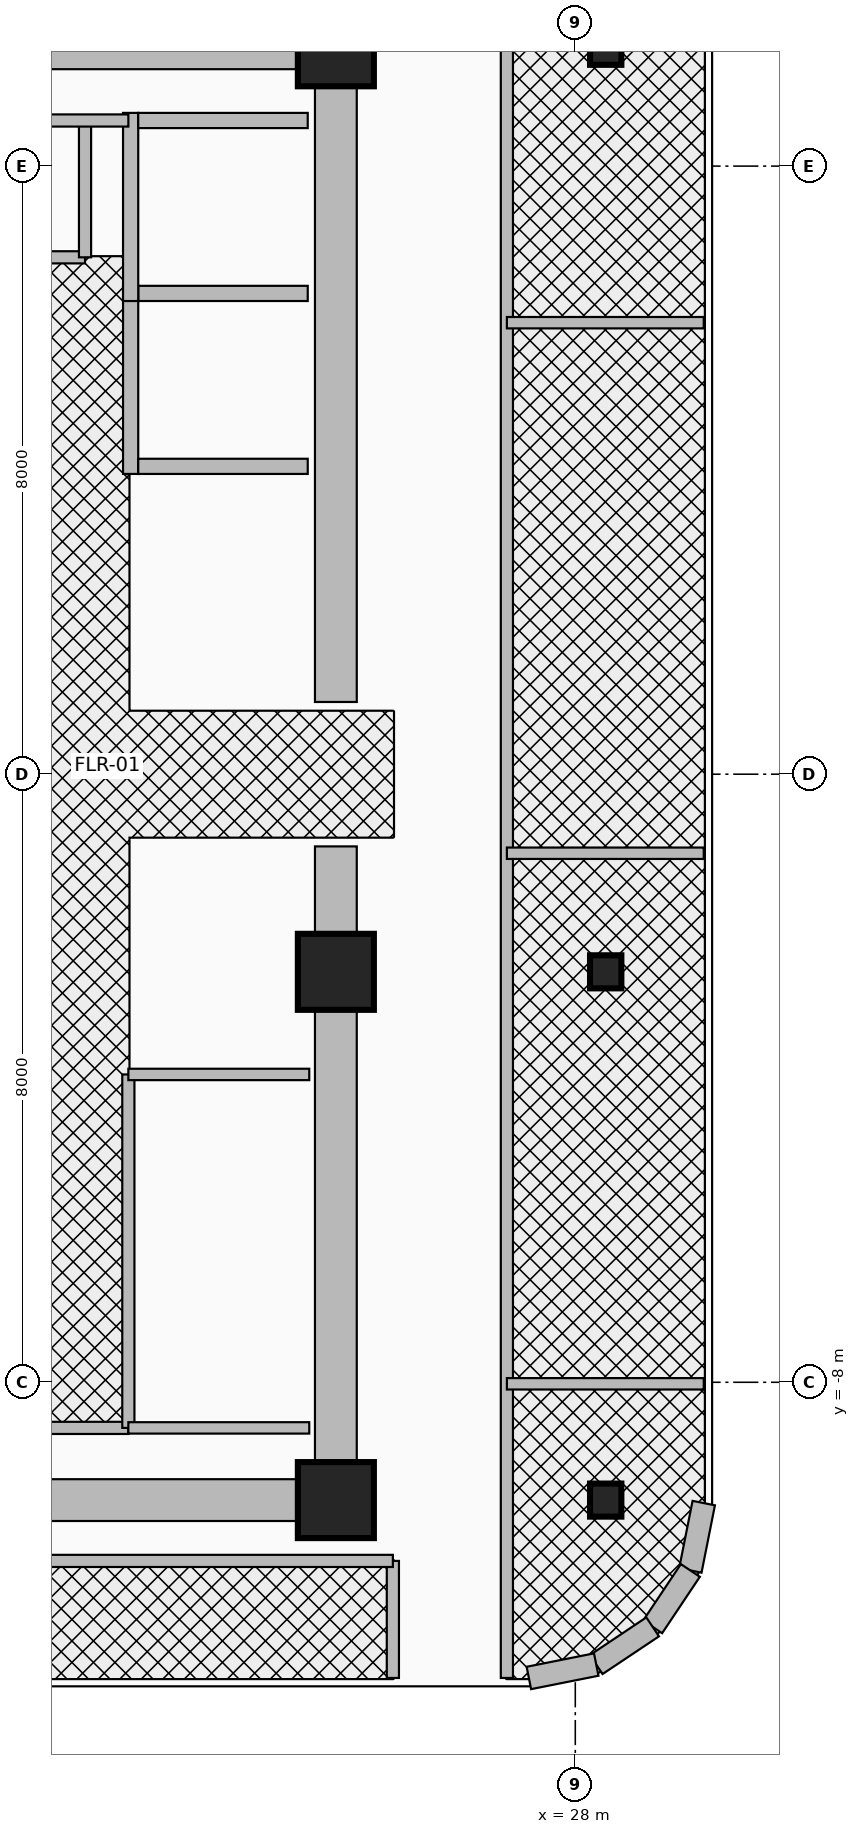
"""IFC4 building model, lengths in metres.
Left out: names, types, materials, properties, quantities, classifications, styles, units other than length and angle.
Written with IfcOpenShell. Run it as: python <this file> out.ifc"""

import sys

from ifc_helpers import new_model, si_unit, direction, frame, frame_2d, origin, origin_2d, place, context, subcontext, project, spatial, rectangle, i_section, extrude, source, transform, mapped, element, fill, save


model = new_model("IFC4")
c1 = context("Model", 3, precision=1e-05, world=origin(), true_north=direction((0.0, 1.0)))
c2 = subcontext(c1, "Body", "Model", "MODEL_VIEW")
j1 = project(units=[si_unit("LENGTHUNIT", "METRE"), si_unit("PLANEANGLEUNIT", "RADIAN")], contexts=[c1])
p1 = place(None, origin())
s1 = spatial("IfcSite", under=j1, at=p1, CompositionType="ELEMENT")
p2 = place(p1, origin())
s2 = spatial("IfcBuilding", under=s1, at=p2, CompositionType="ELEMENT")
p3 = place(p2, frame((0.0, 0.0, 172.3)))
s3 = spatial("IfcBuildingStorey", under=s2, at=p3, CompositionType="ELEMENT", Elevation=172.3)
for number, where, z_axis, x_axis in (
    (1, (24.85, -9.825, 0.0), (0.0, 0.0, 1.0), (0.0, 1.0, 0.0)),
    (2, (24.85, 0.95, 0.0), (0.0, 0.0, 1.0), (0.0, 1.0, 0.0)),
):
    element("IfcWall", number, at=place(p3, frame(where, z_axis=z_axis, x_axis=x_axis)), inside=s3, PredefinedType="SHEAR", context=c2, shape_type="SweptSolid", body=[
        extrude(rectangle(XDim=8.875, YDim=0.55, at=frame_2d((4.438, 0.0))), origin(), (0.0, 0.0, 1.0), 3.93),
    ])
for number, where, z_axis, x_axis in (
    (3, (15.85, 9.55, 0.0), (0.0, 0.0, 1.0), (1.0, 0.0, 0.0)),
    (4, (15.85, -9.55, 0.0), (0.0, 0.0, 1.0), (1.0, 0.0, 0.0)),
):
    element("IfcWall", number, at=place(p3, frame(where, z_axis=z_axis, x_axis=x_axis)), inside=s3, PredefinedType="SHEAR", context=c2, shape_type="SweptSolid", body=[
        extrude(rectangle(XDim=9.0, YDim=0.55, at=frame_2d((4.5, 0.0))), origin(), (0.0, 0.0, 1.0), 3.93),
    ])
m1 = source(origin(), c2, "Body", "SweptSolid", [
    extrude(rectangle(XDim=1.0, YDim=1.0, at=origin_2d()), origin(), (0.0, 0.0, 1.0), 4.25),
])
p4 = place(p3, frame((24.85, -9.55, 0.0), z_axis=(0.0, 0.0, 1.0), x_axis=(1.0, 0.0, 0.0)))
e5 = element("IfcColumn", 5, at=p4, inside=s3, PredefinedType="COLUMN", context=c2, shape_type="MappedRepresentation", body=[
    mapped(m1, transform((0.0, 0.0, 0.0), x_axis=(1.0, 0.0, 0.0), y_axis=(0.0, 1.0, 0.0), z_axis=(0.0, 0.0, 1.0), scale=1.0)),
])
m2 = source(origin(), c2, "Body", "SweptSolid", [
    extrude(i_section(OverallWidth=0.412, OverallDepth=0.435, WebThickness=0.036, FlangeThickness=0.057, at=origin_2d()), origin(), (0.0, 0.0, 1.0), 4.25),
])
p5 = place(p3, frame((28.4, -9.55, 0.0), z_axis=(0.0, 0.0, 1.0), x_axis=(1.0, 0.0, 0.0)))
e6 = element("IfcColumn", 6, at=p5, inside=s3, PredefinedType="COLUMN", context=c2, shape_type="MappedRepresentation", body=[
    mapped(m2, transform((0.0, 0.0, 0.0), x_axis=(1.0, 0.0, 0.0), y_axis=(0.0, 1.0, 0.0), z_axis=(0.0, 0.0, 1.0), scale=1.0)),
])
p6 = place(p3, frame((24.85, -2.6, 0.0), z_axis=(0.0, 0.0, 1.0), x_axis=(1.0, 0.0, 0.0)))
e7 = element("IfcColumn", 7, at=p6, inside=s3, PredefinedType="COLUMN", context=c2, shape_type="MappedRepresentation", body=[
    mapped(m1, transform((0.0, 0.0, 0.0), x_axis=(1.0, 0.0, 0.0), y_axis=(0.0, 1.0, 0.0), z_axis=(0.0, 0.0, 1.0), scale=1.0)),
])
p7 = place(p3, frame((28.4, -2.6, 0.0), z_axis=(0.0, 0.0, 1.0), x_axis=(1.0, 0.0, 0.0)))
e8 = element("IfcColumn", 8, at=p7, inside=s3, PredefinedType="COLUMN", context=c2, shape_type="MappedRepresentation", body=[
    mapped(m2, transform((0.0, 0.0, 0.0), x_axis=(1.0, 0.0, 0.0), y_axis=(0.0, 1.0, 0.0), z_axis=(0.0, 0.0, 1.0), scale=1.0)),
])
p8 = place(p3, frame((24.85, 9.55, 0.0), z_axis=(0.0, 0.0, 1.0), x_axis=(1.0, 0.0, 0.0)))
e9 = element("IfcColumn", 9, at=p8, inside=s3, PredefinedType="COLUMN", context=c2, shape_type="MappedRepresentation", body=[
    mapped(m1, transform((0.0, 0.0, 0.0), x_axis=(1.0, 0.0, 0.0), y_axis=(0.0, 1.0, 0.0), z_axis=(0.0, 0.0, 1.0), scale=1.0)),
])
p9 = place(p3, frame((28.4, 9.55, 0.0), z_axis=(0.0, 0.0, 1.0), x_axis=(1.0, 0.0, 0.0)))
e10 = element("IfcColumn", 10, at=p9, inside=s3, PredefinedType="COLUMN", context=c2, shape_type="MappedRepresentation", body=[
    mapped(m2, transform((0.0, 0.0, 0.0), x_axis=(1.0, 0.0, 0.0), y_axis=(0.0, 1.0, 0.0), z_axis=(0.0, 0.0, 1.0), scale=1.0)),
])
p10 = place(p3, frame((29.69, -9.589, 0.0), z_axis=(0.0, 0.0, 1.0), x_axis=(-0.195025152871, -0.980798241101, 0.0)))
e11 = element("IfcWall", 11, at=p10, inside=s3, PredefinedType="SOLIDWALL", context=c2, shape_type="SweptSolid", body=[
    extrude(rectangle(XDim=0.904, YDim=0.3, at=frame_2d((0.452, 0.0))), origin(), (0.0, 0.0, 1.0), 3.93),
])
p11 = place(p3, frame((29.514, -10.476, 0.0), z_axis=(0.0, 0.0, 1.0), x_axis=(-0.555520488502, -0.831502848374, 0.0)))
e12 = element("IfcWall", 12, at=p11, inside=s3, PredefinedType="SOLIDWALL", context=c2, shape_type="SweptSolid", body=[
    extrude(rectangle(XDim=0.893, YDim=0.3, at=frame_2d((0.446, 0.0))), origin(), (0.0, 0.0, 1.0), 3.93),
])
p12 = place(p3, frame((29.018, -11.218, 0.0), z_axis=(0.0, 0.0, 1.0), x_axis=(-0.83158722889, -0.555394167009, 0.0)))
e13 = element("IfcWall", 13, at=p12, inside=s3, PredefinedType="SOLIDWALL", context=c2, shape_type="SweptSolid", body=[
    extrude(rectangle(XDim=0.893, YDim=0.3, at=frame_2d((0.446, 0.0))), origin(), (0.0, 0.0, 1.0), 3.93),
])
p13 = place(p3, frame((28.275, -11.714, 0.0), z_axis=(0.0, 0.0, 1.0), x_axis=(-0.980787963133, -0.19507683454, 0.0)))
e14 = element("IfcWall", 14, at=p13, inside=s3, PredefinedType="SOLIDWALL", context=c2, shape_type="SweptSolid", body=[
    extrude(rectangle(XDim=0.904, YDim=0.3, at=frame_2d((0.452, 0.0))), origin(), (0.0, 0.0, 1.0), 3.93),
])
p14 = place(p3, frame((22.15, 3.95, 0.0), z_axis=(0.0, 0.0, 1.0), x_axis=(0.0, 1.0, 0.0)))
e15 = element("IfcWall", 15, at=p14, inside=s3, PredefinedType="MOVABLE", context=c2, shape_type="SweptSolid", body=[
    extrude(rectangle(XDim=2.475, YDim=0.2, at=frame_2d((1.238, 0.0))), origin(), (0.0, 0.0, 1.0), 3.93),
])
p15 = place(p14, frame((0.688, 0.0, 0.0)))
e16 = element("IfcOpeningElement", 16, at=p15, cuts=e15, PredefinedType="OPENING", context=c2, shape_type="SweptSolid", body=[
    extrude(rectangle(XDim=1.1, YDim=2.1, at=frame_2d((0.55, 1.05))), frame((0.0, 0.115, 0.0), z_axis=(0.0, -1.0, 0.0), x_axis=(1.0, 0.0, 0.0)), (0.0, 0.0, 1.0), 0.23),
])
for number, where, z_axis, x_axis in (
    (17, (22.25, 4.05, 0.0), (0.0, 0.0, 1.0), (1.0, 0.0, 0.0)),
    (18, (22.25, 6.325, 0.0), (0.0, 0.0, 1.0), (1.0, 0.0, 0.0)),
):
    element("IfcWall", number, at=place(p3, frame(where, z_axis=z_axis, x_axis=x_axis)), inside=s3, PredefinedType="MOVABLE", context=c2, shape_type="SweptSolid", body=[
        extrude(rectangle(XDim=2.23, YDim=0.2, at=frame_2d((1.115, 0.0))), origin(), (0.0, 0.0, 1.0), 3.93),
    ])
p16 = place(p3, frame((22.15, 6.225, 0.0), z_axis=(0.0, 0.0, 1.0), x_axis=(0.0, 1.0, 0.0)))
e19 = element("IfcWall", 19, at=p16, inside=s3, PredefinedType="MOVABLE", context=c2, shape_type="SweptSolid", body=[
    extrude(rectangle(XDim=2.475, YDim=0.2, at=frame_2d((1.237, 0.0))), origin(), (0.0, 0.0, 1.0), 3.93),
])
p17 = place(p16, frame((0.688, 0.0, 0.0)))
e20 = element("IfcOpeningElement", 20, at=p17, cuts=e19, PredefinedType="OPENING", context=c2, shape_type="SweptSolid", body=[
    extrude(rectangle(XDim=1.1, YDim=2.1, at=frame_2d((0.55, 1.05))), frame((0.0, 0.115, 0.0), z_axis=(0.0, -1.0, 0.0), x_axis=(1.0, 0.0, 0.0)), (0.0, 0.0, 1.0), 0.23),
])
p18 = place(p3, frame((22.25, 8.6, 0.0), z_axis=(0.0, 0.0, 1.0), x_axis=(1.0, 0.0, 0.0)))
e21 = element("IfcWall", 21, at=p18, inside=s3, PredefinedType="MOVABLE", context=c2, shape_type="SweptSolid", body=[
    extrude(rectangle(XDim=2.23, YDim=0.2, at=frame_2d((1.115, 0.0))), origin(), (0.0, 0.0, 1.0), 3.93),
])
p19 = place(p3, frame((20.35, 6.8, 0.0), z_axis=(0.0, 0.0, 1.0), x_axis=(1.0, 0.0, 0.0)))
e22 = element("IfcWall", 22, at=p19, inside=s3, PredefinedType="PARTITIONING", context=c2, shape_type="SweptSolid", body=[
    extrude(rectangle(XDim=1.2, YDim=0.16, at=frame_2d((0.6, 0.0))), origin(), (0.0, 0.0, 1.0), 3.93),
])
p20 = place(p19, frame((0.175, 0.0, 0.0)))
e23 = element("IfcOpeningElement", 23, at=p20, cuts=e22, PredefinedType="OPENING", context=c2, shape_type="SweptSolid", body=[
    extrude(rectangle(XDim=0.85, YDim=2.05, at=frame_2d((0.425, 1.025))), frame((0.0, 0.095, 0.0), z_axis=(0.0, -1.0, 0.0), x_axis=(1.0, 0.0, 0.0)), (0.0, 0.0, 1.0), 0.19),
])
p21 = place(p3, frame((21.55, 6.8, 0.0), z_axis=(0.0, 0.0, 1.0), x_axis=(0.0, 1.0, 0.0)))
e24 = element("IfcWall", 24, at=p21, inside=s3, PredefinedType="PARTITIONING", context=c2, shape_type="SweptSolid", body=[
    extrude(rectangle(XDim=1.8, YDim=0.16, at=frame_2d((0.9, 0.0))), origin(), (0.0, 0.0, 1.0), 3.93),
])
for number, where, z_axis, x_axis in (
    (25, (20.3, -8.6, 0.0), (0.0, 0.0, 1.0), (1.0, 0.0, 0.0)),
    (26, (20.3, 8.6, 0.0), (0.0, 0.0, 1.0), (1.0, 0.0, 0.0)),
):
    element("IfcWall", number, at=place(p3, frame(where, z_axis=z_axis, x_axis=x_axis)), inside=s3, PredefinedType="PARTITIONING", context=c2, shape_type="SweptSolid", body=[
        extrude(rectangle(XDim=1.82, YDim=0.16, at=frame_2d((0.91, 0.0))), origin(), (0.0, 0.0, 1.0), 3.93),
    ])
p22 = place(p3, frame((22.12, -8.6, 0.0), z_axis=(0.0, 0.0, 1.0), x_axis=(0.0, 1.0, 0.0)))
e27 = element("IfcWall", 27, at=p22, inside=s3, PredefinedType="PARTITIONING", context=c2, shape_type="SweptSolid", body=[
    extrude(rectangle(XDim=4.65, YDim=0.16, at=frame_2d((2.325, 0.0))), origin(), (0.0, 0.0, 1.0), 3.93),
])
p23 = place(p22, frame((1.8, 0.0, 0.0)))
e28 = element("IfcOpeningElement", 28, at=p23, cuts=e27, PredefinedType="OPENING", context=c2, shape_type="SweptSolid", body=[
    extrude(rectangle(XDim=0.95, YDim=2.15, at=frame_2d((0.475, 1.075))), frame((0.0, 0.095, 0.0), z_axis=(0.0, -1.0, 0.0), x_axis=(1.0, 0.0, 0.0)), (0.0, 0.0, 1.0), 0.19),
])
for number, where, z_axis, x_axis in (
    (29, (22.12, -3.95, 0.0), (0.0, 0.0, 1.0), (1.0, 0.0, 0.0)),
    (30, (22.12, -8.6, 0.0), (0.0, 0.0, 1.0), (1.0, 0.0, 0.0)),
):
    element("IfcWall", number, at=place(p3, frame(where, z_axis=z_axis, x_axis=x_axis)), inside=s3, PredefinedType="PARTITIONING", context=c2, shape_type="SweptSolid", body=[
        extrude(rectangle(XDim=2.38, YDim=0.15, at=frame_2d((1.19, 0.0))), origin(), (0.0, 0.0, 1.0), 3.93),
    ])
p24 = place(p3, frame((25.6, -11.89, 0.0), z_axis=(0.0, 0.0, 1.0), x_axis=(0.0, 1.0, 0.0)))
e31 = element("IfcWall", 31, at=p24, inside=s3, PredefinedType="PARTITIONING", context=c2, shape_type="SweptSolid", body=[
    extrude(rectangle(XDim=1.54, YDim=0.16, at=frame_2d((0.77, 0.0))), origin(), (0.0, 0.0, 1.0), 3.93),
])
p25 = place(p24, frame((0.32, 0.0, 0.0)))
e32 = element("IfcOpeningElement", 32, at=p25, cuts=e31, PredefinedType="OPENING", context=c2, shape_type="SweptSolid", body=[
    extrude(rectangle(XDim=0.9, YDim=2.1, at=frame_2d((0.45, 1.05))), frame((0.0, 0.095, 0.0), z_axis=(0.0, -1.0, 0.0), x_axis=(1.0, 0.0, 0.0)), (0.0, 0.0, 1.0), 0.19),
])
p26 = place(p3, frame((13.889, -10.35, 0.0), z_axis=(0.0, 0.0, 1.0), x_axis=(1.0, 0.0, 0.0)))
e33 = element("IfcWall", 33, at=p26, inside=s3, PredefinedType="PARTITIONING", context=c2, shape_type="SweptSolid", body=[
    extrude(rectangle(XDim=11.711, YDim=0.16, at=frame_2d((5.855, 0.0))), origin(), (0.0, 0.0, 1.0), 3.93),
])
p27 = place(p3, frame((27.1, -11.89, 0.0), z_axis=(0.0, 0.0, 1.0), x_axis=(0.0, 1.0, 0.0)))
e34 = element("IfcWall", 34, at=p27, inside=s3, PredefinedType="PARTITIONING", context=c2, shape_type="SweptSolid", body=[
    extrude(rectangle(XDim=24.81, YDim=0.16, at=frame_2d((12.405, 0.0))), origin(), (0.0, 0.0, 1.0), 2.965),
])
p28 = place(p27, frame((1.12, 0.0, 0.0)))
e35 = element("IfcOpeningElement", 35, at=p28, cuts=e34, PredefinedType="OPENING", context=c2, shape_type="SweptSolid", body=[
    extrude(rectangle(XDim=0.9, YDim=2.1, at=frame_2d((0.45, 1.05))), frame((0.0, 0.095, 0.0), z_axis=(0.0, -1.0, 0.0), x_axis=(1.0, 0.0, 0.0)), (0.0, 0.0, 1.0), 0.19),
])
p29 = place(p27, frame((6.46, 0.0, 0.0)))
e36 = element("IfcOpeningElement", 36, at=p29, cuts=e34, PredefinedType="OPENING", context=c2, shape_type="SweptSolid", body=[
    extrude(rectangle(XDim=1.8, YDim=2.15, at=frame_2d((0.9, 1.075))), frame((0.0, 0.095, 0.0), z_axis=(0.0, -1.0, 0.0), x_axis=(1.0, 0.0, 0.0)), (0.0, 0.0, 1.0), 0.19),
])
p30 = place(p27, frame((13.44, 0.0, 0.0)))
e37 = element("IfcOpeningElement", 37, at=p30, cuts=e34, PredefinedType="OPENING", context=c2, shape_type="SweptSolid", body=[
    extrude(rectangle(XDim=1.8, YDim=2.15, at=frame_2d((0.9, 1.075))), frame((0.0, 0.095, 0.0), z_axis=(0.0, -1.0, 0.0), x_axis=(1.0, 0.0, 0.0)), (0.0, 0.0, 1.0), 0.19),
])
p31 = place(p27, frame((19.27, 0.0, 0.0)))
e38 = element("IfcOpeningElement", 38, at=p31, cuts=e34, PredefinedType="OPENING", context=c2, shape_type="SweptSolid", body=[
    extrude(rectangle(XDim=1.8, YDim=2.15, at=frame_2d((0.9, 1.075))), frame((0.0, 0.095, 0.0), z_axis=(0.0, -1.0, 0.0), x_axis=(1.0, 0.0, 0.0)), (0.0, 0.0, 1.0), 0.19),
])
for number, where, z_axis, x_axis in (
    (39, (27.1, -8.02, 0.0), (0.0, 0.0, 1.0), (1.0, 0.0, 0.0)),
    (40, (27.1, -1.04, 0.0), (0.0, 0.0, 1.0), (1.0, 0.0, 0.0)),
    (41, (27.1, 5.94, 0.0), (0.0, 0.0, 1.0), (1.0, 0.0, 0.0)),
):
    element("IfcWall", number, at=place(p3, frame(where, z_axis=z_axis, x_axis=x_axis)), inside=s3, PredefinedType="PARTITIONING", context=c2, shape_type="SweptSolid", body=[
        extrude(rectangle(XDim=2.59, YDim=0.15, at=frame_2d((1.295, 0.0))), origin(), (0.0, 0.0, 1.0), 3.376),
    ])
p32 = place(p15, origin())
e42 = element("IfcDoor", 42, at=p32, inside=s3, OperationType="DOUBLE_DOOR_SLIDING", PredefinedType="DOOR", context=c2, shape_type="SweptSolid", body=[
    extrude(rectangle(XDim=1.1, YDim=2.1, at=frame_2d((0.55, 1.05))), frame((0.0, 0.025, 0.0), z_axis=(0.0, -1.0, 0.0), x_axis=(1.0, 0.0, 0.0)), (0.0, 0.0, 1.0), 0.05),
])
fill(e16, e42)
p33 = place(p17, origin())
e43 = element("IfcDoor", 43, at=p33, inside=s3, OperationType="DOUBLE_DOOR_SLIDING", PredefinedType="DOOR", context=c2, shape_type="SweptSolid", body=[
    extrude(rectangle(XDim=1.1, YDim=2.1, at=frame_2d((0.55, 1.05))), frame((0.0, 0.025, 0.0), z_axis=(0.0, -1.0, 0.0), x_axis=(1.0, 0.0, 0.0)), (0.0, 0.0, 1.0), 0.05),
])
fill(e20, e43)
p34 = place(p20, origin())
e44 = element("IfcDoor", 44, at=p34, inside=s3, OperationType="SINGLE_SWING_RIGHT", PredefinedType="DOOR", context=c2, shape_type="SweptSolid", body=[
    extrude(rectangle(XDim=0.85, YDim=2.05, at=frame_2d((0.425, 1.025))), frame((0.0, 0.025, 0.0), z_axis=(0.0, -1.0, 0.0), x_axis=(1.0, 0.0, 0.0)), (0.0, 0.0, 1.0), 0.05),
])
fill(e23, e44)
p35 = place(p23, origin())
e45 = element("IfcDoor", 45, at=p35, inside=s3, OperationType="SINGLE_SWING_LEFT", PredefinedType="DOOR", context=c2, shape_type="SweptSolid", body=[
    extrude(rectangle(XDim=0.95, YDim=2.15, at=frame_2d((0.475, 1.075))), frame((0.0, 0.025, 0.0), z_axis=(0.0, -1.0, 0.0), x_axis=(1.0, 0.0, 0.0)), (0.0, 0.0, 1.0), 0.05),
])
fill(e28, e45)
p36 = place(p25, frame((0.9, 0.0, 0.0), z_axis=(0.0, 0.0, 1.0), x_axis=(-1.0, 0.0, 0.0)))
e46 = element("IfcDoor", 46, at=p36, inside=s3, OperationType="SINGLE_SWING_LEFT", PredefinedType="DOOR", context=c2, shape_type="SweptSolid", body=[
    extrude(rectangle(XDim=0.9, YDim=2.1, at=frame_2d((0.45, 1.05))), frame((0.0, 0.025, 0.0), z_axis=(0.0, -1.0, 0.0), x_axis=(1.0, 0.0, 0.0)), (0.0, 0.0, 1.0), 0.05),
])
fill(e32, e46)
p37 = place(p28, frame((0.9, 0.0, 0.0), z_axis=(0.0, 0.0, 1.0), x_axis=(-1.0, 0.0, 0.0)))
e47 = element("IfcDoor", 47, at=p37, inside=s3, OperationType="SINGLE_SWING_LEFT", PredefinedType="DOOR", context=c2, shape_type="SweptSolid", body=[
    extrude(rectangle(XDim=0.9, YDim=2.1, at=frame_2d((0.45, 1.05))), frame((0.0, 0.025, 0.0), z_axis=(0.0, -1.0, 0.0), x_axis=(1.0, 0.0, 0.0)), (0.0, 0.0, 1.0), 0.05),
])
fill(e35, e47)
p38 = place(p29, origin())
e48 = element("IfcDoor", 48, at=p38, inside=s3, OperationType="DOUBLE_DOOR_SINGLE_SWING", PredefinedType="DOOR", context=c2, shape_type="SweptSolid", body=[
    extrude(rectangle(XDim=1.8, YDim=2.15, at=frame_2d((0.9, 1.075))), frame((0.0, 0.025, 0.0), z_axis=(0.0, -1.0, 0.0), x_axis=(1.0, 0.0, 0.0)), (0.0, 0.0, 1.0), 0.05),
])
fill(e36, e48)
p39 = place(p30, frame((1.8, 0.0, 0.0), z_axis=(0.0, 0.0, 1.0), x_axis=(-1.0, 0.0, 0.0)))
e49 = element("IfcDoor", 49, at=p39, inside=s3, OperationType="DOUBLE_DOOR_SINGLE_SWING", PredefinedType="DOOR", context=c2, shape_type="SweptSolid", body=[
    extrude(rectangle(XDim=1.8, YDim=2.15, at=frame_2d((0.9, 1.075))), frame((0.0, 0.025, 0.0), z_axis=(0.0, -1.0, 0.0), x_axis=(1.0, 0.0, 0.0)), (0.0, 0.0, 1.0), 0.05),
])
fill(e37, e49)
p40 = place(p31, origin())
e50 = element("IfcDoor", 50, at=p40, inside=s3, OperationType="DOUBLE_DOOR_SINGLE_SWING", PredefinedType="DOOR", context=c2, shape_type="SweptSolid", body=[
    extrude(rectangle(XDim=1.8, YDim=2.15, at=frame_2d((0.9, 1.075))), frame((0.0, 0.025, 0.0), z_axis=(0.0, -1.0, 0.0), x_axis=(1.0, 0.0, 0.0)), (0.0, 0.0, 1.0), 0.05),
])
fill(e38, e50)
save(model, sys.argv[1])
